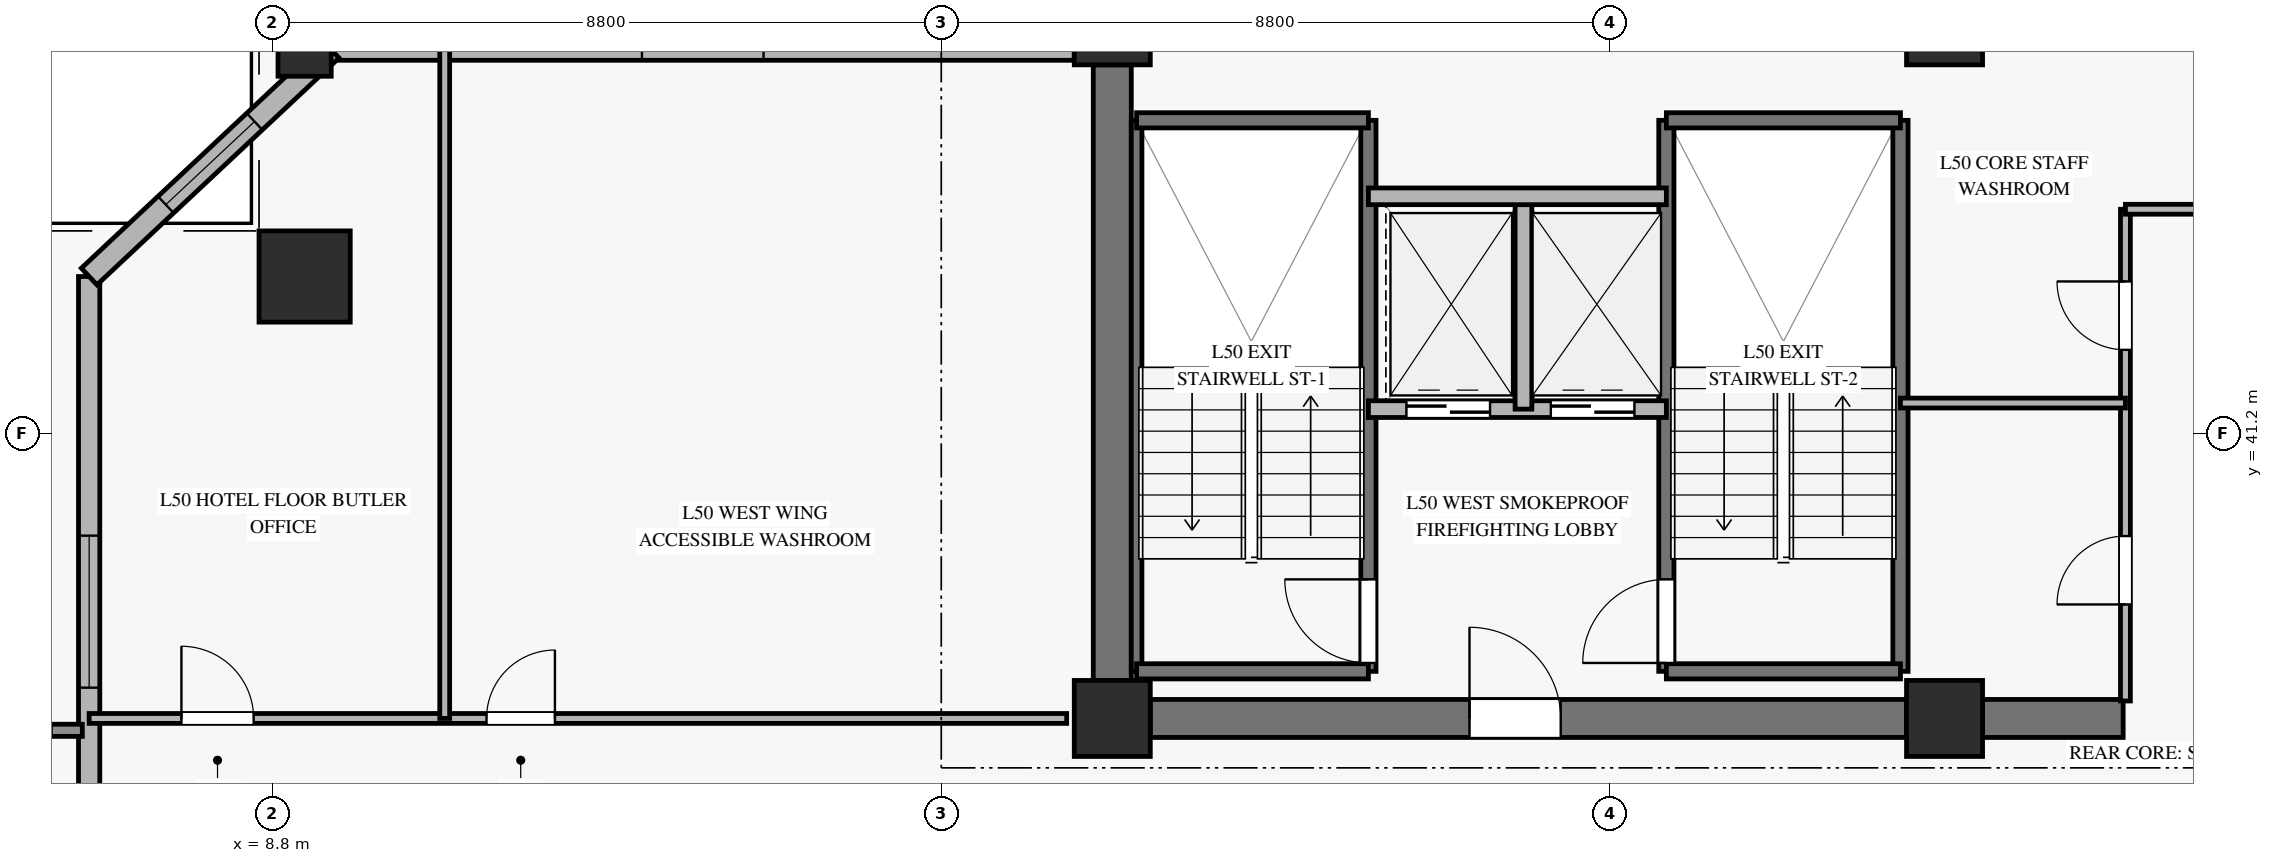
"""IFC4 building model, lengths in metres.
Left out: names, types, materials, properties, quantities, classifications, styles, units other than length and angle.
Written with IfcOpenShell. Run it as: python <this file> out.ifc"""

import sys

from ifc_helpers import new_model, si_unit, direction, frame, frame_2d, origin, origin_2d, place, context, subcontext, project, spatial, rectangle, hollow_rectangle, extrude, source, transform, mapped, element, fill, save


model = new_model("IFC4")
c1 = context("Model", 3, precision=1e-05, world=origin(), true_north=direction((0.0, 1.0)))
c2 = subcontext(c1, "Body", "Model", "MODEL_VIEW")
j1 = project(units=[si_unit("LENGTHUNIT", "METRE"), si_unit("PLANEANGLEUNIT", "RADIAN")], contexts=[c1])
p1 = place(None, origin())
s1 = spatial("IfcSite", under=j1, at=p1, CompositionType="ELEMENT")
p2 = place(p1, origin())
s2 = spatial("IfcBuilding", under=s1, at=p2, CompositionType="ELEMENT")
p3 = place(p2, frame((0.0, 0.0, 199.2)))
s3 = spatial("IfcBuildingStorey", under=s2, at=p3, CompositionType="ELEMENT", Elevation=199.2)
m1 = source(origin(), c2, "Body", "SweptSolid", [
    extrude(rectangle(XDim=1.0, YDim=1.0, at=origin_2d()), origin(), (0.0, 0.0, 1.0), 3.27),
])
for number, where, z_axis, x_axis in (
    (1, (19.85, 37.45, 0.0), (0.0, 0.0, 1.0), (1.0, 0.0, 0.0)),
    (2, (19.85, 46.55, 0.0), (0.0, 0.0, 1.0), (1.0, 0.0, 0.0)),
    (3, (30.8, 37.45, 0.0), (0.0, 0.0, 1.0), (1.0, 0.0, 0.0)),
    (4, (30.8, 46.55, 0.0), (0.0, 0.0, 1.0), (1.0, 0.0, 0.0)),
):
    element("IfcColumn", number, at=place(p3, frame(where, z_axis=z_axis, x_axis=x_axis)), inside=s3, PredefinedType="PILASTER", context=c2, shape_type="MappedRepresentation", body=[
        mapped(m1, transform((0.0, 0.0, 0.0), x_axis=(1.0, 0.0, 0.0), y_axis=(0.0, 1.0, 0.0), z_axis=(0.0, 0.0, 1.0), scale=1.0)),
    ])
p4 = place(p3, frame((20.35, 37.45, 0.0), z_axis=(0.0, 0.0, 1.0), x_axis=(1.0, 0.0, 0.0)))
e5 = element("IfcWall", 5, at=p4, inside=s3, PredefinedType="SHEAR", context=c2, shape_type="SweptSolid", body=[
    extrude(rectangle(XDim=9.95, YDim=0.5, at=frame_2d((4.975, 0.0))), origin(), (0.0, 0.0, 1.0), 3.27),
])
p5 = place(p4, frame((4.2, 0.0, 0.0)))
e6 = element("IfcOpeningElement", 6, at=p5, cuts=e5, PredefinedType="OPENING", context=c2, shape_type="SweptSolid", body=[
    extrude(rectangle(XDim=1.2, YDim=2.15, at=frame_2d((0.6, 1.075))), frame((0.0, 0.26, 0.0), z_axis=(0.0, -1.0, 0.0), x_axis=(1.0, 0.0, 0.0)), (0.0, 0.0, 1.0), 0.52),
])
p6 = place(p3, frame((31.3, 37.45, 0.0), z_axis=(0.0, 0.0, 1.0), x_axis=(1.0, 0.0, 0.0)))
e7 = element("IfcWall", 7, at=p6, inside=s3, PredefinedType="SHEAR", context=c2, shape_type="SweptSolid", body=[
    extrude(rectangle(XDim=1.85, YDim=0.5, at=frame_2d((0.925, 0.0))), origin(), (0.0, 0.0, 1.0), 3.27),
])
p7 = place(p3, frame((19.85, 37.95, 0.0), z_axis=(0.0, 0.0, 1.0), x_axis=(0.0, 1.0, 0.0)))
e8 = element("IfcWall", 8, at=p7, inside=s3, PredefinedType="SHEAR", context=c2, shape_type="SweptSolid", body=[
    extrude(rectangle(XDim=8.1, YDim=0.5, at=frame_2d((4.05, 0.0))), origin(), (0.0, 0.0, 1.0), 3.27),
])
m2 = source(origin(), c2, "Body", "SweptSolid", [
    extrude(hollow_rectangle(XDim=1.2, YDim=1.2, WallThickness=0.055, at=origin_2d()), origin(), (0.0, 0.0, 1.0), 3.282),
])
p8 = place(p3, frame((9.224, 43.265, 0.0), z_axis=(0.084948951981, 0.010711601651, 0.996327725775), x_axis=(-0.125103926908, 0.99214364256, 0.0)))
e9 = element("IfcColumn", 9, at=p8, inside=s3, PredefinedType="COLUMN", context=c2, shape_type="MappedRepresentation", body=[
    mapped(m2, transform((0.0, 0.0, 0.0), x_axis=(1.0, 0.0, 0.0), y_axis=(0.0, 1.0, 0.0), z_axis=(0.0, 0.0, 1.0), scale=1.0)),
])
m3 = source(origin(), c2, "Body", "SweptSolid", [
    extrude(hollow_rectangle(XDim=0.7, YDim=0.7, WallThickness=0.032, at=origin_2d()), origin(), (0.0, 0.0, 1.0), 3.282),
])
p9 = place(p3, frame((9.224, 46.25, 0.0), z_axis=(0.084953825854, 0.0, 0.996384889223), x_axis=(0.0, 1.0, 0.0)))
e10 = element("IfcColumn", 10, at=p9, inside=s3, PredefinedType="COLUMN", context=c2, shape_type="MappedRepresentation", body=[
    mapped(m3, transform((0.0, 0.0, 0.0), x_axis=(1.0, 0.0, 0.0), y_axis=(0.0, 1.0, 0.0), z_axis=(0.0, 0.0, 1.0), scale=1.0)),
])
p10 = place(p3, frame((6.389, 28.74, 0.0), z_axis=(0.0, 0.0, 1.0), x_axis=(0.0, 1.0, 0.0)))
e11 = element("IfcWall", 11, at=p10, inside=s3, PredefinedType="SOLIDWALL", context=c2, shape_type="SweptSolid", body=[
    extrude(rectangle(XDim=14.525, YDim=0.28, at=frame_2d((7.262, 0.0))), origin(), (0.0, 0.0, 1.0), 2.75),
])
p11 = place(p10, frame((9.115, 0.0, 0.45)))
e12 = element("IfcOpeningElement", 12, at=p11, cuts=e11, PredefinedType="OPENING", context=c2, shape_type="SweptSolid", body=[
    extrude(rectangle(XDim=2.0, YDim=2.0, at=frame_2d((1.0, 1.0))), frame((0.0, 0.15, 0.0), z_axis=(0.0, -1.0, 0.0), x_axis=(1.0, 0.0, 0.0)), (0.0, 0.0, 1.0), 0.3),
])
p12 = place(p3, frame((9.574, 46.25, 0.0), z_axis=(0.0, 0.0, 1.0), x_axis=(1.0, 0.0, 0.0)))
e13 = element("IfcWall", 13, at=p12, inside=s3, PredefinedType="SOLIDWALL", context=c2, shape_type="SweptSolid", body=[
    extrude(rectangle(XDim=9.776, YDim=0.28, at=frame_2d((4.888, 0.0))), origin(), (0.0, 0.0, 1.0), 2.75),
])
p13 = place(p12, frame((4.088, 0.0, 0.45)))
e14 = element("IfcOpeningElement", 14, at=p13, cuts=e13, PredefinedType="OPENING", context=c2, shape_type="SweptSolid", body=[
    extrude(rectangle(XDim=1.6, YDim=2.0, at=frame_2d((0.8, 1.0))), frame((0.0, 0.15, 0.0), z_axis=(0.0, -1.0, 0.0), x_axis=(1.0, 0.0, 0.0)), (0.0, 0.0, 1.0), 0.3),
])
p14 = place(p3, frame((9.574, 46.25, 0.0), z_axis=(0.0, 0.0, 1.0), x_axis=(-0.729638355144, -0.683833218484, 0.0)))
e15 = element("IfcWall", 15, at=p14, inside=s3, PredefinedType="SOLIDWALL", context=c2, shape_type="SweptSolid", body=[
    extrude(rectangle(XDim=4.365, YDim=0.3, at=frame_2d((2.183, 0.0))), origin(), (0.0, 0.0, 1.0), 2.75),
])
p15 = place(p14, frame((1.383, 0.0, 0.45)))
e16 = element("IfcOpeningElement", 16, at=p15, cuts=e15, PredefinedType="OPENING", context=c2, shape_type="SweptSolid", body=[
    extrude(rectangle(XDim=1.6, YDim=2.0, at=frame_2d((0.8, 1.0))), frame((0.0, 0.16, 0.0), z_axis=(0.0, -1.0, 0.0), x_axis=(1.0, 0.0, 0.0)), (0.0, 0.0, 1.0), 0.32),
])
p16 = place(p3, frame((20.17, 38.07, 0.0), z_axis=(0.0, 0.0, 1.0), x_axis=(0.0, 1.0, 0.0)))
e17 = element("IfcWall", 17, at=p16, inside=s3, PredefinedType="SOLIDWALL", context=c2, shape_type="SweptSolid", body=[
    extrude(rectangle(XDim=7.25, YDim=0.14, at=frame_2d((3.625, 0.0))), origin(), (0.0, 0.0, 1.0), 3.5),
])
p17 = place(p3, frame((23.22, 38.07, 0.0), z_axis=(0.0, 0.0, 1.0), x_axis=(0.0, 1.0, 0.0)))
e18 = element("IfcWall", 18, at=p17, inside=s3, PredefinedType="SOLIDWALL", context=c2, shape_type="SweptSolid", body=[
    extrude(rectangle(XDim=7.25, YDim=0.2, at=frame_2d((3.625, 0.0))), origin(), (0.0, 0.0, 1.0), 3.5),
])
p18 = place(p17, frame((0.11, 0.0, 0.0)))
e19 = element("IfcOpeningElement", 19, at=p18, cuts=e18, PredefinedType="OPENING", context=c2, shape_type="SweptSolid", body=[
    extrude(rectangle(XDim=1.1, YDim=2.15, at=frame_2d((0.55, 1.075))), frame((0.0, 0.11, 0.0), z_axis=(0.0, -1.0, 0.0), x_axis=(1.0, 0.0, 0.0)), (0.0, 0.0, 1.0), 0.22),
])
for number, where, z_axis, x_axis in (
    (20, (20.17, 45.32, 0.0), (0.0, 0.0, 1.0), (1.0, 0.0, 0.0)),
    (21, (20.17, 38.07, 0.0), (0.0, 0.0, 1.0), (1.0, 0.0, 0.0)),
):
    element("IfcWall", number, at=place(p3, frame(where, z_axis=z_axis, x_axis=x_axis)), inside=s3, PredefinedType="SOLIDWALL", context=c2, shape_type="SweptSolid", body=[
        extrude(rectangle(XDim=3.05, YDim=0.2, at=frame_2d((1.525, 0.0))), origin(), (0.0, 0.0, 1.0), 3.5),
    ])
p19 = place(p3, frame((27.14, 38.07, 0.0), z_axis=(0.0, 0.0, 1.0), x_axis=(0.0, 1.0, 0.0)))
e22 = element("IfcWall", 22, at=p19, inside=s3, PredefinedType="SOLIDWALL", context=c2, shape_type="SweptSolid", body=[
    extrude(rectangle(XDim=7.25, YDim=0.2, at=frame_2d((3.625, 0.0))), origin(), (0.0, 0.0, 1.0), 3.5),
])
p20 = place(p19, frame((0.11, 0.0, 0.0)))
e23 = element("IfcOpeningElement", 23, at=p20, cuts=e22, PredefinedType="OPENING", context=c2, shape_type="SweptSolid", body=[
    extrude(rectangle(XDim=1.1, YDim=2.15, at=frame_2d((0.55, 1.075))), frame((0.0, 0.11, 0.0), z_axis=(0.0, -1.0, 0.0), x_axis=(1.0, 0.0, 0.0)), (0.0, 0.0, 1.0), 0.22),
])
p21 = place(p3, frame((30.22, 38.07, 0.0), z_axis=(0.0, 0.0, 1.0), x_axis=(0.0, 1.0, 0.0)))
e24 = element("IfcWall", 24, at=p21, inside=s3, PredefinedType="SOLIDWALL", context=c2, shape_type="SweptSolid", body=[
    extrude(rectangle(XDim=7.25, YDim=0.2, at=frame_2d((3.625, 0.0))), origin(), (0.0, 0.0, 1.0), 3.5),
])
for number, where, z_axis, x_axis in (
    (25, (27.14, 45.32, 0.0), (0.0, 0.0, 1.0), (1.0, 0.0, 0.0)),
    (26, (27.14, 38.07, 0.0), (0.0, 0.0, 1.0), (1.0, 0.0, 0.0)),
):
    element("IfcWall", number, at=place(p3, frame(where, z_axis=z_axis, x_axis=x_axis)), inside=s3, PredefinedType="SOLIDWALL", context=c2, shape_type="SweptSolid", body=[
        extrude(rectangle(XDim=3.08, YDim=0.2, at=frame_2d((1.54, 0.0))), origin(), (0.0, 0.0, 1.0), 3.5),
    ])
p22 = place(p3, frame((23.22, 41.52, 0.0), z_axis=(0.0, 0.0, 1.0), x_axis=(1.0, 0.0, 0.0)))
e27 = element("IfcWall", 27, at=p22, inside=s3, PredefinedType="SOLIDWALL", context=c2, shape_type="SweptSolid", body=[
    extrude(rectangle(XDim=3.92, YDim=0.22, at=frame_2d((1.96, 0.0))), origin(), (0.0, 0.0, 1.0), 3.27),
])
p23 = place(p22, frame((0.5, 0.0, 0.0)))
e28 = element("IfcOpeningElement", 28, at=p23, cuts=e27, PredefinedType="OPENING", context=c2, shape_type="SweptSolid", body=[
    extrude(rectangle(XDim=1.1, YDim=2.2, at=frame_2d((0.55, 1.1))), frame((0.0, 0.12, 0.0), z_axis=(0.0, -1.0, 0.0), x_axis=(1.0, 0.0, 0.0)), (0.0, 0.0, 1.0), 0.24),
])
p24 = place(p22, frame((2.4, 0.0, 0.0)))
e29 = element("IfcOpeningElement", 29, at=p24, cuts=e27, PredefinedType="OPENING", context=c2, shape_type="SweptSolid", body=[
    extrude(rectangle(XDim=1.1, YDim=2.2, at=frame_2d((0.55, 1.1))), frame((0.0, 0.12, 0.0), z_axis=(0.0, -1.0, 0.0), x_axis=(1.0, 0.0, 0.0)), (0.0, 0.0, 1.0), 0.24),
])
p25 = place(p3, frame((25.26, 41.52, 0.0), z_axis=(0.0, 0.0, 1.0), x_axis=(0.0, 1.0, 0.0)))
e30 = element("IfcWall", 30, at=p25, inside=s3, PredefinedType="SOLIDWALL", context=c2, shape_type="SweptSolid", body=[
    extrude(rectangle(XDim=2.8, YDim=0.22, at=frame_2d((1.4, 0.0))), origin(), (0.0, 0.0, 1.0), 3.27),
])
p26 = place(p3, frame((23.22, 44.32, 0.0), z_axis=(0.0, 0.0, 1.0), x_axis=(1.0, 0.0, 0.0)))
e31 = element("IfcWall", 31, at=p26, inside=s3, PredefinedType="SOLIDWALL", context=c2, shape_type="SweptSolid", body=[
    extrude(rectangle(XDim=3.92, YDim=0.22, at=frame_2d((1.96, 0.0))), origin(), (0.0, 0.0, 1.0), 3.27),
])
p27 = place(p3, frame((33.18, 37.68, 0.0), z_axis=(0.0, 0.0, 1.0), x_axis=(0.0, 1.0, 0.0)))
e32 = element("IfcWall", 32, at=p27, inside=s3, PredefinedType="PARTITIONING", context=c2, shape_type="SweptSolid", body=[
    extrude(rectangle(XDim=6.47, YDim=0.13, at=frame_2d((3.235, 0.0))), origin(), (0.0, 0.0, 1.0), 2.355),
])
p28 = place(p27, frame((1.27, 0.0, 0.0)))
e33 = element("IfcOpeningElement", 33, at=p28, cuts=e32, PredefinedType="OPENING", context=c2, shape_type="SweptSolid", body=[
    extrude(rectangle(XDim=0.9, YDim=2.1, at=frame_2d((0.45, 1.05))), frame((0.0, 0.075, 0.0), z_axis=(0.0, -1.0, 0.0), x_axis=(1.0, 0.0, 0.0)), (0.0, 0.0, 1.0), 0.15),
])
p29 = place(p27, frame((4.62, 0.0, 0.0)))
e34 = element("IfcOpeningElement", 34, at=p29, cuts=e32, PredefinedType="OPENING", context=c2, shape_type="SweptSolid", body=[
    extrude(rectangle(XDim=0.9, YDim=2.1, at=frame_2d((0.45, 1.05))), frame((0.0, 0.075, 0.0), z_axis=(0.0, -1.0, 0.0), x_axis=(1.0, 0.0, 0.0)), (0.0, 0.0, 1.0), 0.15),
])
p30 = place(p3, frame((33.18, 44.15, 0.0), z_axis=(0.0, 0.0, 1.0), x_axis=(1.0, 0.0, 0.0)))
e35 = element("IfcWall", 35, at=p30, inside=s3, PredefinedType="PARTITIONING", context=c2, shape_type="SweptSolid", body=[
    extrude(rectangle(XDim=2.97, YDim=0.13, at=frame_2d((1.485, 0.0))), origin(), (0.0, 0.0, 1.0), 2.555),
])
p31 = place(p3, frame((30.22, 41.6, 0.0), z_axis=(0.0, 0.0, 1.0), x_axis=(1.0, 0.0, 0.0)))
e36 = element("IfcWall", 36, at=p31, inside=s3, PredefinedType="PARTITIONING", context=c2, shape_type="SweptSolid", body=[
    extrude(rectangle(XDim=2.96, YDim=0.13, at=frame_2d((1.48, 0.0))), origin(), (0.0, 0.0, 1.0), 2.555),
])
p32 = place(p3, frame((6.389, 37.45, 0.0), z_axis=(0.0, 0.0, 1.0), x_axis=(1.0, 0.0, 0.0)))
e37 = element("IfcWall", 37, at=p32, inside=s3, PredefinedType="PARTITIONING", context=c2, shape_type="SweptSolid", body=[
    extrude(rectangle(XDim=12.861, YDim=0.13, at=frame_2d((6.431, 0.0))), origin(), (0.0, 0.0, 1.0), 2.755),
])
p33 = place(p32, frame((1.214, 0.0, 0.0)))
e38 = element("IfcOpeningElement", 38, at=p33, cuts=e37, PredefinedType="OPENING", context=c2, shape_type="SweptSolid", body=[
    extrude(rectangle(XDim=0.95, YDim=2.1, at=frame_2d((0.475, 1.05))), frame((0.0, 0.075, 0.0), z_axis=(0.0, -1.0, 0.0), x_axis=(1.0, 0.0, 0.0)), (0.0, 0.0, 1.0), 0.15),
])
p34 = place(p32, frame((5.228, 0.0, 0.0)))
e39 = element("IfcOpeningElement", 39, at=p34, cuts=e37, PredefinedType="OPENING", context=c2, shape_type="SweptSolid", body=[
    extrude(rectangle(XDim=0.9, YDim=2.1, at=frame_2d((0.45, 1.05))), frame((0.0, 0.075, 0.0), z_axis=(0.0, -1.0, 0.0), x_axis=(1.0, 0.0, 0.0)), (0.0, 0.0, 1.0), 0.15),
])
p35 = place(p3, frame((11.067, 37.45, 0.0), z_axis=(0.0, 0.0, 1.0), x_axis=(0.0, 1.0, 0.0)))
e40 = element("IfcWall", 40, at=p35, inside=s3, PredefinedType="PARTITIONING", context=c2, shape_type="SweptSolid", body=[
    extrude(rectangle(XDim=8.8, YDim=0.13, at=frame_2d((4.4, 0.0))), origin(), (0.0, 0.0, 1.0), 3.27),
])
m4 = source(origin(), c2, "Body", "SweptSolid", [
    extrude(rectangle(XDim=2.0, YDim=2.0, at=frame_2d((1.0, 1.0))), frame((0.0, 0.03, 0.0), z_axis=(0.0, -1.0, 0.0), x_axis=(1.0, 0.0, 0.0)), (0.0, 0.0, 1.0), 0.06),
])
p36 = place(p11, origin())
e41 = element("IfcWindow", 41, at=p36, inside=s3, PartitioningType="SINGLE_PANEL", PredefinedType="WINDOW", context=c2, shape_type="MappedRepresentation", body=[
    mapped(m4, transform((0.0, 0.0, 0.0), x_axis=(1.0, 0.0, 0.0), y_axis=(0.0, 1.0, 0.0), z_axis=(0.0, 0.0, 1.0), scale=1.0)),
])
fill(e12, e41)
m5 = source(origin(), c2, "Body", "SweptSolid", [
    extrude(rectangle(XDim=1.6, YDim=2.0, at=frame_2d((0.8, 1.0))), frame((0.0, 0.03, 0.0), z_axis=(0.0, -1.0, 0.0), x_axis=(1.0, 0.0, 0.0)), (0.0, 0.0, 1.0), 0.06),
])
p37 = place(p15, origin())
e42 = element("IfcWindow", 42, at=p37, inside=s3, PartitioningType="SINGLE_PANEL", PredefinedType="WINDOW", context=c2, shape_type="MappedRepresentation", body=[
    mapped(m5, transform((0.0, 0.0, 0.0), x_axis=(1.0, 0.0, 0.0), y_axis=(0.0, 1.0, 0.0), z_axis=(0.0, 0.0, 1.0), scale=1.0)),
])
fill(e16, e42)
m6 = source(origin(), c2, "Body", "SweptSolid", [
    extrude(rectangle(XDim=1.1, YDim=2.15, at=frame_2d((0.55, 1.075))), frame((0.0, 0.025, 0.0), z_axis=(0.0, -1.0, 0.0), x_axis=(1.0, 0.0, 0.0)), (0.0, 0.0, 1.0), 0.05),
])
p38 = place(p18, origin())
e43 = element("IfcDoor", 43, at=p38, inside=s3, OperationType="SINGLE_SWING_RIGHT", PredefinedType="DOOR", context=c2, shape_type="MappedRepresentation", body=[
    mapped(m6, transform((0.0, 0.0, 0.0), x_axis=(1.0, 0.0, 0.0), y_axis=(0.0, 1.0, 0.0), z_axis=(0.0, 0.0, 1.0), scale=1.0)),
])
fill(e19, e43)
p39 = place(p20, origin())
e44 = element("IfcDoor", 44, at=p39, inside=s3, OperationType="SINGLE_SWING_LEFT", PredefinedType="DOOR", context=c2, shape_type="MappedRepresentation", body=[
    mapped(m6, transform((0.0, 0.0, 0.0), x_axis=(1.0, 0.0, 0.0), y_axis=(0.0, 1.0, 0.0), z_axis=(0.0, 0.0, 1.0), scale=1.0)),
])
fill(e23, e44)
m7 = source(origin(), c2, "Body", "SweptSolid", [
    extrude(rectangle(XDim=1.1, YDim=2.2, at=frame_2d((0.55, 1.1))), frame((0.0, 0.025, 0.0), z_axis=(0.0, -1.0, 0.0), x_axis=(1.0, 0.0, 0.0)), (0.0, 0.0, 1.0), 0.05),
])
p40 = place(p23, origin())
e45 = element("IfcDoor", 45, at=p40, inside=s3, OperationType="SLIDING_TO_LEFT", PredefinedType="DOOR", context=c2, shape_type="MappedRepresentation", body=[
    mapped(m7, transform((0.0, 0.0, 0.0), x_axis=(1.0, 0.0, 0.0), y_axis=(0.0, 1.0, 0.0), z_axis=(0.0, 0.0, 1.0), scale=1.0)),
])
fill(e28, e45)
p41 = place(p24, origin())
e46 = element("IfcDoor", 46, at=p41, inside=s3, OperationType="SLIDING_TO_LEFT", PredefinedType="DOOR", context=c2, shape_type="MappedRepresentation", body=[
    mapped(m7, transform((0.0, 0.0, 0.0), x_axis=(1.0, 0.0, 0.0), y_axis=(0.0, 1.0, 0.0), z_axis=(0.0, 0.0, 1.0), scale=1.0)),
])
fill(e29, e46)
m8 = source(origin(), c2, "Body", "SweptSolid", [
    extrude(rectangle(XDim=1.2, YDim=2.15, at=frame_2d((0.6, 1.075))), frame((0.0, 0.025, 0.0), z_axis=(0.0, -1.0, 0.0), x_axis=(1.0, 0.0, 0.0)), (0.0, 0.0, 1.0), 0.05),
])
p42 = place(p5, origin())
e47 = element("IfcDoor", 47, at=p42, inside=s3, OperationType="SINGLE_SWING_LEFT", PredefinedType="DOOR", context=c2, shape_type="MappedRepresentation", body=[
    mapped(m8, transform((0.0, 0.0, 0.0), x_axis=(1.0, 0.0, 0.0), y_axis=(0.0, 1.0, 0.0), z_axis=(0.0, 0.0, 1.0), scale=1.0)),
])
fill(e6, e47)
m9 = source(origin(), c2, "Body", "SweptSolid", [
    extrude(rectangle(XDim=0.9, YDim=2.1, at=frame_2d((0.45, 1.05))), frame((0.0, 0.025, 0.0), z_axis=(0.0, -1.0, 0.0), x_axis=(1.0, 0.0, 0.0)), (0.0, 0.0, 1.0), 0.05),
])
p43 = place(p28, origin())
e48 = element("IfcDoor", 48, at=p43, inside=s3, OperationType="SINGLE_SWING_LEFT", PredefinedType="DOOR", context=c2, shape_type="MappedRepresentation", body=[
    mapped(m9, transform((0.0, 0.0, 0.0), x_axis=(1.0, 0.0, 0.0), y_axis=(0.0, 1.0, 0.0), z_axis=(0.0, 0.0, 1.0), scale=1.0)),
])
fill(e33, e48)
p44 = place(p29, origin())
e49 = element("IfcDoor", 49, at=p44, inside=s3, OperationType="SINGLE_SWING_RIGHT", PredefinedType="DOOR", context=c2, shape_type="MappedRepresentation", body=[
    mapped(m9, transform((0.0, 0.0, 0.0), x_axis=(1.0, 0.0, 0.0), y_axis=(0.0, 1.0, 0.0), z_axis=(0.0, 0.0, 1.0), scale=1.0)),
])
fill(e34, e49)
m10 = source(origin(), c2, "Body", "SweptSolid", [
    extrude(rectangle(XDim=0.95, YDim=2.1, at=frame_2d((0.475, 1.05))), frame((0.0, 0.025, 0.0), z_axis=(0.0, -1.0, 0.0), x_axis=(1.0, 0.0, 0.0)), (0.0, 0.0, 1.0), 0.05),
])
p45 = place(p33, origin())
e50 = element("IfcDoor", 50, at=p45, inside=s3, OperationType="SINGLE_SWING_LEFT", PredefinedType="DOOR", context=c2, shape_type="MappedRepresentation", body=[
    mapped(m10, transform((0.0, 0.0, 0.0), x_axis=(1.0, 0.0, 0.0), y_axis=(0.0, 1.0, 0.0), z_axis=(0.0, 0.0, 1.0), scale=1.0)),
])
fill(e38, e50)
p46 = place(p34, origin())
e51 = element("IfcDoor", 51, at=p46, inside=s3, OperationType="SINGLE_SWING_RIGHT", PredefinedType="DOOR", context=c2, shape_type="MappedRepresentation", body=[
    mapped(m9, transform((0.0, 0.0, 0.0), x_axis=(1.0, 0.0, 0.0), y_axis=(0.0, 1.0, 0.0), z_axis=(0.0, 0.0, 1.0), scale=1.0)),
])
fill(e39, e51)
save(model, sys.argv[1])
